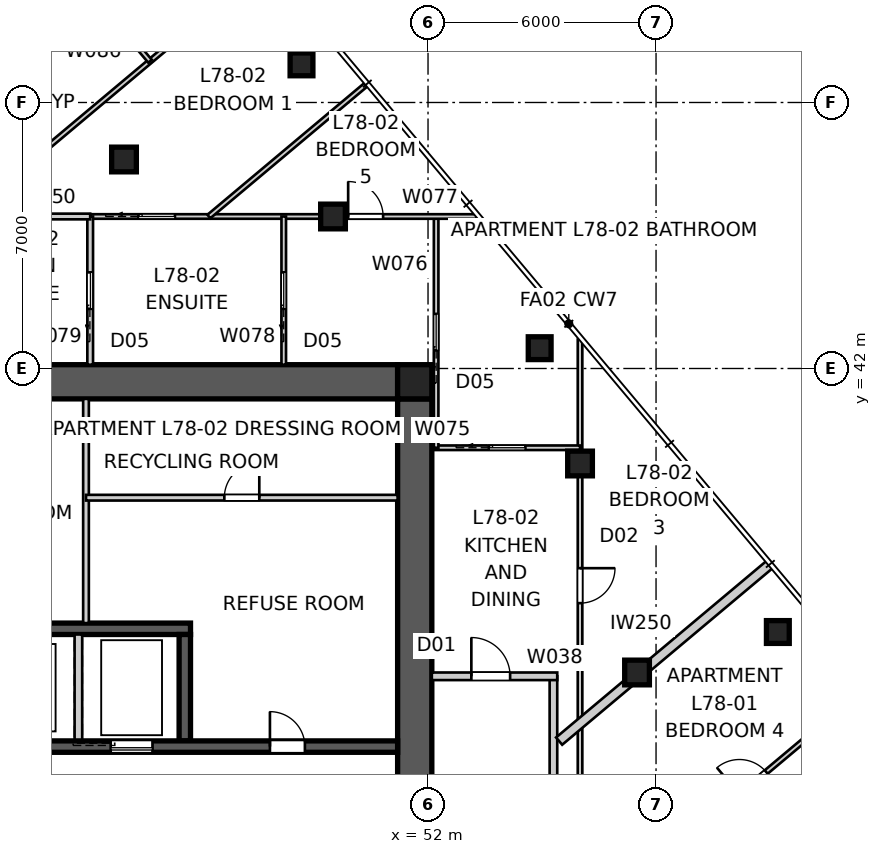
"""IFC4 building model, lengths in metres.
Left out: names, types, materials, properties, quantities, classifications, styles, units other than length and angle.
Written with IfcOpenShell. Run it as: python <this file> out.ifc"""

import sys

from ifc_helpers import new_model, si_unit, direction, frame, frame_2d, origin, origin_2d, place, context, subcontext, project, spatial, polyline, rectangle, outline, extrude, element, fill, save


model = new_model("IFC4")
c1 = context("Model", 3, precision=1e-05, world=origin(), true_north=direction((0.0, 1.0)))
c2 = subcontext(c1, "Body", "Model", "MODEL_VIEW")
j1 = project(units=[si_unit("LENGTHUNIT", "METRE"), si_unit("PLANEANGLEUNIT", "RADIAN")], contexts=[c1])
p1 = place(None, origin())
s1 = spatial("IfcSite", under=j1, at=p1, CompositionType="ELEMENT")
p2 = place(p1, origin())
s2 = spatial("IfcBuilding", under=s1, at=p2, CompositionType="ELEMENT")
p3 = place(p2, frame((0.0, 0.0, 282.8)))
s3 = spatial("IfcBuildingStorey", under=s2, at=p3, CompositionType="ELEMENT", Elevation=282.8)
p4 = place(p3, frame((28.8, 41.65, 0.0), z_axis=(0.0, 0.0, 1.0), x_axis=(1.0, 0.0, 0.0)))
e1 = element("IfcWall", 1, at=p4, inside=s3, PredefinedType="SHEAR", context=c2, shape_type="SweptSolid", body=[
    extrude(outline(polyline([(0.0, -0.45), (22.4, -0.45), (22.4, -0.025), (22.85, -0.025), (22.85, 0.025), (22.4, 0.025), (22.4, 0.45), (0.0, 0.45), (0.0, 0.025), (-0.45, 0.025), (-0.45, -0.025), (0.0, -0.025), (0.0, -0.45)])), origin(), (0.0, 0.0, 1.0), 3.4),
])
p5 = place(p3, frame((51.65, 18.8, 0.0), z_axis=(0.0, 0.0, 1.0), x_axis=(0.0, 1.0, 0.0)))
e2 = element("IfcWall", 2, at=p5, inside=s3, PredefinedType="SHEAR", context=c2, shape_type="SweptSolid", body=[
    extrude(outline(polyline([(0.0, -0.45), (22.4, -0.45), (22.4, -0.025), (22.85, -0.025), (22.85, 0.025), (22.4, 0.025), (22.4, 0.45), (0.0, 0.45), (0.0, 0.025), (-0.45, 0.025), (-0.45, -0.025), (0.0, -0.025), (0.0, -0.45)])), origin(), (0.0, 0.0, 1.0), 3.4),
])
p6 = place(p5, frame((11.14, 0.0, 0.0)))
e3 = element("IfcOpeningElement", 3, at=p6, cuts=e2, PredefinedType="OPENING", context=c2, shape_type="SweptSolid", body=[
    extrude(rectangle(XDim=1.02, YDim=2.4, at=frame_2d((0.51, 1.2))), frame((0.0, 0.46, 0.0), z_axis=(0.0, -1.0, 0.0), x_axis=(1.0, 0.0, 0.0)), (0.0, 0.0, 1.0), 0.92),
])
p7 = place(p3, frame((28.8, 32.05, 0.0), z_axis=(0.0, 0.0, 1.0), x_axis=(1.0, 0.0, 0.0)))
e4 = element("IfcWall", 4, at=p7, inside=s3, PredefinedType="SHEAR", context=c2, shape_type="SweptSolid", body=[
    extrude(rectangle(XDim=22.4, YDim=0.3, at=frame_2d((11.2, 0.0))), origin(), (0.0, 0.0, 1.0), 3.4),
])
p8 = place(p7, frame((19.04, 0.0, 0.0)))
e5 = element("IfcOpeningElement", 5, at=p8, cuts=e4, PredefinedType="OPENING", context=c2, shape_type="SweptSolid", body=[
    extrude(rectangle(XDim=0.92, YDim=2.1, at=frame_2d((0.46, 1.05))), frame((0.0, 0.16, 0.0), z_axis=(0.0, -1.0, 0.0), x_axis=(1.0, 0.0, 0.0)), (0.0, 0.0, 1.0), 0.32),
])
p9 = place(p7, frame((1.265, 0.0, 0.0)))
e6 = element("IfcOpeningElement", 6, at=p9, cuts=e4, PredefinedType="OPENING", context=c2, shape_type="SweptSolid", body=[
    extrude(rectangle(XDim=1.02, YDim=2.1, at=frame_2d((0.51, 1.05))), frame((0.0, 0.16, 0.0), z_axis=(0.0, -1.0, 0.0), x_axis=(1.0, 0.0, 0.0)), (0.0, 0.0, 1.0), 0.32),
])
p10 = place(p7, frame((4.015, 0.0, 0.0)))
e7 = element("IfcOpeningElement", 7, at=p10, cuts=e4, PredefinedType="OPENING", context=c2, shape_type="SweptSolid", body=[
    extrude(rectangle(XDim=0.92, YDim=2.1, at=frame_2d((0.46, 1.05))), frame((0.0, 0.16, 0.0), z_axis=(0.0, -1.0, 0.0), x_axis=(1.0, 0.0, 0.0)), (0.0, 0.0, 1.0), 0.32),
])
p11 = place(p7, frame((6.565, 0.0, 0.0)))
e8 = element("IfcOpeningElement", 8, at=p11, cuts=e4, PredefinedType="OPENING", context=c2, shape_type="SweptSolid", body=[
    extrude(rectangle(XDim=0.92, YDim=2.1, at=frame_2d((0.46, 1.05))), frame((0.0, 0.16, 0.0), z_axis=(0.0, -1.0, 0.0), x_axis=(1.0, 0.0, 0.0)), (0.0, 0.0, 1.0), 0.32),
])
p12 = place(p7, frame((8.89, 0.0, 0.0)))
e9 = element("IfcOpeningElement", 9, at=p12, cuts=e4, PredefinedType="OPENING", context=c2, shape_type="SweptSolid", body=[
    extrude(rectangle(XDim=0.92, YDim=2.1, at=frame_2d((0.46, 1.05))), frame((0.0, 0.16, 0.0), z_axis=(0.0, -1.0, 0.0), x_axis=(1.0, 0.0, 0.0)), (0.0, 0.0, 1.0), 0.32),
])
p13 = place(p7, frame((12.05, 0.0, 0.0)))
e10 = element("IfcOpeningElement", 10, at=p13, cuts=e4, PredefinedType="OPENING", context=c2, shape_type="SweptSolid", body=[
    extrude(rectangle(XDim=1.1, YDim=2.1, at=frame_2d((0.55, 1.05))), frame((0.0, 0.16, 0.0), z_axis=(0.0, -1.0, 0.0), x_axis=(1.0, 0.0, 0.0)), (0.0, 0.0, 1.0), 0.32),
])
p14 = place(p7, frame((14.85, 0.0, 0.0)))
e11 = element("IfcOpeningElement", 11, at=p14, cuts=e4, PredefinedType="OPENING", context=c2, shape_type="SweptSolid", body=[
    extrude(rectangle(XDim=1.1, YDim=2.1, at=frame_2d((0.55, 1.05))), frame((0.0, 0.16, 0.0), z_axis=(0.0, -1.0, 0.0), x_axis=(1.0, 0.0, 0.0)), (0.0, 0.0, 1.0), 0.32),
])
p15 = place(p3, frame((34.25, 35.15, 0.0), z_axis=(0.0, 0.0, 1.0), x_axis=(1.0, 0.0, 0.0)))
e12 = element("IfcWall", 12, at=p15, inside=s3, PredefinedType="SHEAR", context=c2, shape_type="SweptSolid", body=[
    extrude(rectangle(XDim=11.5, YDim=0.3, at=frame_2d((5.75, 0.0))), origin(), (0.0, 0.0, 1.0), 3.4),
])
p16 = place(p3, frame((42.8, 32.2, 0.0), z_axis=(0.0, 0.0, 1.0), x_axis=(0.0, 1.0, 0.0)))
e13 = element("IfcWall", 13, at=p16, inside=s3, PredefinedType="SOLIDWALL", context=c2, shape_type="SweptSolid", body=[
    extrude(rectangle(XDim=2.8, YDim=0.2, at=frame_2d((1.4, 0.0))), origin(), (0.0, 0.0, 1.0), 3.4),
])
p17 = place(p3, frame((45.6, 32.2, 0.0), z_axis=(0.0, 0.0, 1.0), x_axis=(0.0, 1.0, 0.0)))
e14 = element("IfcWall", 14, at=p17, inside=s3, PredefinedType="SHEAR", context=c2, shape_type="SweptSolid", body=[
    extrude(rectangle(XDim=2.8, YDim=0.3, at=frame_2d((1.4, 0.0))), origin(), (0.0, 0.0, 1.0), 3.4),
])
p18 = place(p3, frame((51.65, 41.65, 0.0), z_axis=(0.0, 0.0, 1.0), x_axis=(1.0, 0.0, 0.0)))
e15 = element("IfcColumn", 15, at=p18, inside=s3, PredefinedType="COLUMN", context=c2, shape_type="SweptSolid", body=[
    extrude(rectangle(XDim=0.9, YDim=0.9, at=origin_2d()), origin(), (0.0, 0.0, 1.0), 3.4),
])
for number, where, z_axis, x_axis in (
    (16, (61.205, 35.065, 0.0), (0.0, 0.0, 1.0), (1.0, 0.0, 0.0)),
    (17, (54.938, 42.534, 0.0), (0.0, 0.0, 1.0), (1.0, 0.0, 0.0)),
    (18, (48.671, 50.003, 0.0), (0.0, 0.0, 1.0), (1.0, 0.0, 0.0)),
):
    element("IfcColumn", number, at=place(p3, frame(where, z_axis=z_axis, x_axis=x_axis)), inside=s3, PredefinedType="COLUMN", context=c2, shape_type="SweptSolid", body=[
        extrude(rectangle(XDim=0.6, YDim=0.6, at=origin_2d()), origin(), (0.0, 0.0, 1.0), 3.4),
    ])
for number, where, z_axis, x_axis in (
    (19, (57.5, 34.0, 0.0), (0.0, 0.0, 1.0), (1.0, 0.0, 0.0)),
    (20, (56.0, 39.5, 0.0), (0.0, 0.0, 1.0), (1.0, 0.0, 0.0)),
    (21, (49.5, 46.0, 0.0), (0.0, 0.0, 1.0), (1.0, 0.0, 0.0)),
    (22, (44.0, 47.5, 0.0), (0.0, 0.0, 1.0), (1.0, 0.0, 0.0)),
):
    element("IfcColumn", number, at=place(p3, frame(where, z_axis=z_axis, x_axis=x_axis)), inside=s3, PredefinedType="COLUMN", context=c2, shape_type="SweptSolid", body=[
        extrude(rectangle(XDim=0.65, YDim=0.65, at=origin_2d()), origin(), (0.0, 0.0, 1.0), 3.4),
    ])
p19 = place(p3, frame((55.3, 26.1, 0.0), z_axis=(0.0, 0.0, 1.0), x_axis=(0.0, 1.0, 0.0)))
e23 = element("IfcWall", 23, at=p19, inside=s3, PredefinedType="PARTITIONING", context=c2, shape_type="SweptSolid", body=[
    extrude(rectangle(XDim=7.8, YDim=0.2, at=frame_2d((3.9, 0.0))), origin(), (0.0, 0.0, 1.0), 3.25),
])
p20 = place(p3, frame((52.1, 33.9, 0.0), z_axis=(0.0, 0.0, 1.0), x_axis=(1.0, 0.0, 0.0)))
e24 = element("IfcWall", 24, at=p20, inside=s3, PredefinedType="PARTITIONING", context=c2, shape_type="SweptSolid", body=[
    extrude(rectangle(XDim=3.3, YDim=0.2, at=frame_2d((1.65, 0.0))), origin(), (0.0, 0.0, 1.0), 3.25),
])
p21 = place(p20, frame((1.04, 0.0, 0.0)))
e25 = element("IfcOpeningElement", 25, at=p21, cuts=e24, PredefinedType="OPENING", context=c2, shape_type="SweptSolid", body=[
    extrude(rectangle(XDim=1.02, YDim=2.34, at=frame_2d((0.51, 1.17))), frame((0.0, 0.11, 0.0), z_axis=(0.0, -1.0, 0.0), x_axis=(1.0, 0.0, 0.0)), (0.0, 0.0, 1.0), 0.22),
])
p22 = place(p3, frame((61.007, 36.857, 0.0), z_axis=(0.0, 0.0, 1.0), x_axis=(-0.766054150891, -0.642776040237, 0.0)))
e26 = element("IfcWall", 26, at=p22, inside=s3, PredefinedType="PARTITIONING", context=c2, shape_type="SweptSolid", body=[
    extrude(rectangle(XDim=7.254, YDim=0.25, at=frame_2d((3.627, 0.0))), origin(), (0.0, 0.0, 1.0), 3.25),
])
p23 = place(p3, frame((43.0, 41.2, 0.0), z_axis=(0.0, 0.0, 1.0), x_axis=(0.0, -1.0, 0.0)))
e27 = element("IfcWall", 27, at=p23, inside=s3, PredefinedType="SOLIDWALL", context=c2, shape_type="SweptSolid", body=[
    extrude(rectangle(XDim=5.9, YDim=0.15, at=frame_2d((2.95, 0.0))), origin(), (0.0, 0.0, 1.0), 3.25),
])
p24 = place(p3, frame((43.0, 38.6, 0.0), z_axis=(0.0, 0.0, 1.0), x_axis=(1.0, 0.0, 0.0)))
e28 = element("IfcWall", 28, at=p24, inside=s3, PredefinedType="SOLIDWALL", context=c2, shape_type="SweptSolid", body=[
    extrude(rectangle(XDim=8.2, YDim=0.15, at=frame_2d((4.1, 0.0))), origin(), (0.0, 0.0, 1.0), 3.25),
])
p25 = place(p24, frame((3.64, 0.0, 0.0)))
e29 = element("IfcOpeningElement", 29, at=p25, cuts=e28, PredefinedType="OPENING", context=c2, shape_type="SweptSolid", body=[
    extrude(rectangle(XDim=0.92, YDim=2.1, at=frame_2d((0.46, 1.05))), frame((0.0, 0.085, 0.0), z_axis=(0.0, -1.0, 0.0), x_axis=(1.0, 0.0, 0.0)), (0.0, 0.0, 1.0), 0.17),
])
p26 = place(p3, frame((56.0, 42.762, 0.0), z_axis=(0.0, 0.0, 1.0), x_axis=(0.0, -1.0, 0.0)))
e30 = element("IfcWall", 30, at=p26, inside=s3, PredefinedType="PARTITIONING", context=c2, shape_type="SweptSolid", body=[
    extrude(rectangle(XDim=18.995, YDim=0.12, at=frame_2d((9.498, 0.0))), origin(), (0.0, 0.0, 1.0), 2.549),
])
p27 = place(p26, frame((17.238, 0.0, 0.0)))
e31 = element("IfcOpeningElement", 31, at=p27, cuts=e30, PredefinedType="OPENING", context=c2, shape_type="SweptSolid", body=[
    extrude(rectangle(XDim=0.92, YDim=2.34, at=frame_2d((0.46, 1.17))), frame((0.0, 0.07, 0.0), z_axis=(0.0, -1.0, 0.0), x_axis=(1.0, 0.0, 0.0)), (0.0, 0.0, 1.0), 0.14),
])
p28 = place(p26, frame((6.017, 0.0, 0.0)))
e32 = element("IfcOpeningElement", 32, at=p28, cuts=e30, PredefinedType="OPENING", context=c2, shape_type="SweptSolid", body=[
    extrude(rectangle(XDim=0.92, YDim=2.34, at=frame_2d((0.46, 1.17))), frame((0.0, 0.07, 0.0), z_axis=(0.0, -1.0, 0.0), x_axis=(1.0, 0.0, 0.0)), (0.0, 0.0, 1.0), 0.14),
])
p29 = place(p3, frame((57.434, 28.475, 0.0), z_axis=(0.0, 0.0, 1.0), x_axis=(0.766033729027, 0.642800378028, 0.0)))
e33 = element("IfcWall", 33, at=p29, inside=s3, PredefinedType="PARTITIONING", context=c2, shape_type="SweptSolid", body=[
    extrude(rectangle(XDim=8.085, YDim=0.12, at=frame_2d((4.042, 0.0))), origin(), (0.0, 0.0, 1.0), 3.25),
])
p30 = place(p29, frame((3.603, 0.0, 0.0)))
e34 = element("IfcOpeningElement", 34, at=p30, cuts=e33, PredefinedType="OPENING", context=c2, shape_type="SweptSolid", body=[
    extrude(rectangle(XDim=0.92, YDim=2.34, at=frame_2d((0.46, 1.17))), frame((0.0, 0.07, 0.0), z_axis=(0.0, -1.0, 0.0), x_axis=(1.0, 0.0, 0.0)), (0.0, 0.0, 1.0), 0.14),
])
p31 = place(p3, frame((52.163, 39.914, 0.0), z_axis=(0.0, 0.0, 1.0), x_axis=(1.0, 0.0, 0.0)))
e35 = element("IfcWall", 35, at=p31, inside=s3, PredefinedType="PARTITIONING", context=c2, shape_type="SweptSolid", body=[
    extrude(rectangle(XDim=3.837, YDim=0.12, at=frame_2d((1.918, 0.0))), origin(), (0.0, 0.0, 1.0), 3.25),
])
p32 = place(p31, frame((1.438, 0.0, 0.0)))
e36 = element("IfcOpeningElement", 36, at=p32, cuts=e35, PredefinedType="OPENING", context=c2, shape_type="SweptSolid", body=[
    extrude(rectangle(XDim=0.96, YDim=2.1, at=frame_2d((0.48, 1.05))), frame((0.0, 0.07, 0.0), z_axis=(0.0, -1.0, 0.0), x_axis=(1.0, 0.0, 0.0)), (0.0, 0.0, 1.0), 0.14),
])
p33 = place(p3, frame((52.213, 39.914, 0.0), z_axis=(0.0, 0.0, 1.0), x_axis=(0.0, 1.0, 0.0)))
e37 = element("IfcWall", 37, at=p33, inside=s3, PredefinedType="PARTITIONING", context=c2, shape_type="SweptSolid", body=[
    extrude(rectangle(XDim=6.086, YDim=0.12, at=frame_2d((3.043, 0.0))), origin(), (0.0, 0.0, 1.0), 3.25),
])
p34 = place(p33, frame((2.563, 0.0, 0.0)))
e38 = element("IfcOpeningElement", 38, at=p34, cuts=e37, PredefinedType="OPENING", context=c2, shape_type="SweptSolid", body=[
    extrude(rectangle(XDim=0.96, YDim=2.1, at=frame_2d((0.48, 1.05))), frame((0.0, 0.07, 0.0), z_axis=(0.0, -1.0, 0.0), x_axis=(1.0, 0.0, 0.0)), (0.0, 0.0, 1.0), 0.14),
])
p35 = place(p3, frame((43.11, 46.0, 0.0), z_axis=(0.0, 0.0, 1.0), x_axis=(1.0, 0.0, 0.0)))
e39 = element("IfcWall", 39, at=p35, inside=s3, PredefinedType="PARTITIONING", context=c2, shape_type="SweptSolid", body=[
    extrude(rectangle(XDim=10.173, YDim=0.12, at=frame_2d((5.086, 0.0))), origin(), (0.0, 0.0, 1.0), 2.549),
])
p36 = place(p35, frame((6.788, 0.0, 0.0)))
e40 = element("IfcOpeningElement", 40, at=p36, cuts=e39, PredefinedType="OPENING", context=c2, shape_type="SweptSolid", body=[
    extrude(rectangle(XDim=0.92, YDim=2.34, at=frame_2d((0.46, 1.17))), frame((0.0, 0.07, 0.0), z_axis=(0.0, -1.0, 0.0), x_axis=(1.0, 0.0, 0.0)), (0.0, 0.0, 1.0), 0.14),
])
p37 = place(p35, frame((1.271, 0.0, 0.0)))
e41 = element("IfcOpeningElement", 41, at=p37, cuts=e39, PredefinedType="OPENING", context=c2, shape_type="SweptSolid", body=[
    extrude(rectangle(XDim=0.96, YDim=2.1, at=frame_2d((0.48, 1.05))), frame((0.0, 0.07, 0.0), z_axis=(0.0, -1.0, 0.0), x_axis=(1.0, 0.0, 0.0)), (0.0, 0.0, 1.0), 0.14),
])
p38 = place(p3, frame((48.203, 42.1, 0.0), z_axis=(0.0, 0.0, 1.0), x_axis=(0.0, 1.0, 0.0)))
e42 = element("IfcWall", 42, at=p38, inside=s3, PredefinedType="PARTITIONING", context=c2, shape_type="SweptSolid", body=[
    extrude(rectangle(XDim=3.9, YDim=0.12, at=frame_2d((1.95, 0.0))), origin(), (0.0, 0.0, 1.0), 3.25),
])
p39 = place(p38, frame((1.47, 0.0, 0.0)))
e43 = element("IfcOpeningElement", 43, at=p39, cuts=e42, PredefinedType="OPENING", context=c2, shape_type="SweptSolid", body=[
    extrude(rectangle(XDim=0.96, YDim=2.1, at=frame_2d((0.48, 1.05))), frame((0.0, 0.07, 0.0), z_axis=(0.0, -1.0, 0.0), x_axis=(1.0, 0.0, 0.0)), (0.0, 0.0, 1.0), 0.14),
])
p40 = place(p3, frame((43.11, 42.1, 0.0), z_axis=(0.0, 0.0, 1.0), x_axis=(0.0, 1.0, 0.0)))
e44 = element("IfcWall", 44, at=p40, inside=s3, PredefinedType="SOLIDWALL", context=c2, shape_type="SweptSolid", body=[
    extrude(rectangle(XDim=3.9, YDim=0.15, at=frame_2d((1.95, 0.0))), origin(), (0.0, 0.0, 1.0), 3.25),
])
p41 = place(p40, frame((1.47, 0.0, 0.0)))
e45 = element("IfcOpeningElement", 45, at=p41, cuts=e44, PredefinedType="OPENING", context=c2, shape_type="SweptSolid", body=[
    extrude(rectangle(XDim=0.96, YDim=2.1, at=frame_2d((0.48, 1.05))), frame((0.0, 0.085, 0.0), z_axis=(0.0, -1.0, 0.0), x_axis=(1.0, 0.0, 0.0)), (0.0, 0.0, 1.0), 0.17),
])
p42 = place(p3, frame((39.153, 46.0, 0.0), z_axis=(0.0, 0.0, 1.0), x_axis=(1.0, 0.0, 0.0)))
e46 = element("IfcWall", 46, at=p42, inside=s3, PredefinedType="SOLIDWALL", context=c2, shape_type="SweptSolid", body=[
    extrude(rectangle(XDim=3.958, YDim=0.15, at=frame_2d((1.979, 0.0))), origin(), (0.0, 0.0, 1.0), 3.25),
])
p43 = place(p3, frame((47.719, 52.631, 0.0), z_axis=(0.0, 0.0, 1.0), x_axis=(-0.766052076481, -0.64277851249, 0.0)))
e47 = element("IfcWall", 47, at=p43, inside=s3, PredefinedType="PARTITIONING", context=c2, shape_type="SweptSolid", body=[
    extrude(rectangle(XDim=10.316, YDim=0.12, at=frame_2d((5.158, 0.0))), origin(), (0.0, 0.0, 1.0), 3.25),
])
p44 = place(p3, frame((42.06, 53.215, 0.0), z_axis=(0.0, 0.0, 1.0), x_axis=(0.642796729538, -0.766036790562, 0.0)))
e48 = element("IfcWall", 48, at=p44, inside=s3, PredefinedType="PARTITIONING", context=c2, shape_type="SweptSolid", body=[
    extrude(rectangle(XDim=4.085, YDim=0.12, at=frame_2d((2.042, 0.0))), origin(), (0.0, 0.0, 1.0), 3.25),
])
p45 = place(p44, frame((1.538, 0.0, 0.0)))
e49 = element("IfcOpeningElement", 49, at=p45, cuts=e48, PredefinedType="OPENING", context=c2, shape_type="SweptSolid", body=[
    extrude(rectangle(XDim=0.92, YDim=2.34, at=frame_2d((0.46, 1.17))), frame((0.0, 0.07, 0.0), z_axis=(0.0, -1.0, 0.0), x_axis=(1.0, 0.0, 0.0)), (0.0, 0.0, 1.0), 0.14),
])
p46 = place(p3, frame((50.37, 49.471, 0.0), z_axis=(0.0, 0.0, 1.0), x_axis=(-0.766056536168, -0.642773197476, 0.0)))
e50 = element("IfcWall", 50, at=p46, inside=s3, PredefinedType="PARTITIONING", context=c2, shape_type="SweptSolid", body=[
    extrude(rectangle(XDim=5.4, YDim=0.12, at=frame_2d((2.7, 0.0))), origin(), (0.0, 0.0, 1.0), 3.25),
])
p47 = place(p8, origin())
e51 = element("IfcDoor", 51, at=p47, inside=s3, OperationType="SINGLE_SWING_LEFT", PredefinedType="DOOR", context=c2, shape_type="SweptSolid", body=[
    extrude(rectangle(XDim=0.92, YDim=2.1, at=frame_2d((0.46, 1.05))), frame((0.0, 0.025, 0.0), z_axis=(0.0, -1.0, 0.0), x_axis=(1.0, 0.0, 0.0)), (0.0, 0.0, 1.0), 0.05),
])
fill(e5, e51)
p48 = place(p21, origin())
e52 = element("IfcDoor", 52, at=p48, inside=s3, OperationType="SINGLE_SWING_LEFT", PredefinedType="DOOR", context=c2, shape_type="SweptSolid", body=[
    extrude(rectangle(XDim=1.02, YDim=2.34, at=frame_2d((0.51, 1.17))), frame((0.0, 0.025, 0.0), z_axis=(0.0, -1.0, 0.0), x_axis=(1.0, 0.0, 0.0)), (0.0, 0.0, 1.0), 0.05),
])
fill(e25, e52)
p49 = place(p25, origin())
e53 = element("IfcDoor", 53, at=p49, inside=s3, OperationType="SINGLE_SWING_RIGHT", PredefinedType="DOOR", context=c2, shape_type="SweptSolid", body=[
    extrude(rectangle(XDim=0.92, YDim=2.1, at=frame_2d((0.46, 1.05))), frame((0.0, 0.025, 0.0), z_axis=(0.0, -1.0, 0.0), x_axis=(1.0, 0.0, 0.0)), (0.0, 0.0, 1.0), 0.05),
])
fill(e29, e53)
p50 = place(p28, origin())
e54 = element("IfcDoor", 54, at=p50, inside=s3, OperationType="SINGLE_SWING_LEFT", PredefinedType="DOOR", context=c2, shape_type="SweptSolid", body=[
    extrude(rectangle(XDim=0.92, YDim=2.34, at=frame_2d((0.46, 1.17))), frame((0.0, 0.025, 0.0), z_axis=(0.0, -1.0, 0.0), x_axis=(1.0, 0.0, 0.0)), (0.0, 0.0, 1.0), 0.05),
])
fill(e32, e54)
p51 = place(p32, origin())
e55 = element("IfcDoor", 55, at=p51, inside=s3, OperationType="SLIDING_TO_LEFT", PredefinedType="DOOR", context=c2, shape_type="SweptSolid", body=[
    extrude(rectangle(XDim=0.96, YDim=2.1, at=frame_2d((0.48, 1.05))), frame((0.0, 0.025, 0.0), z_axis=(0.0, -1.0, 0.0), x_axis=(1.0, 0.0, 0.0)), (0.0, 0.0, 1.0), 0.05),
])
fill(e36, e55)
p52 = place(p34, origin())
e56 = element("IfcDoor", 56, at=p52, inside=s3, OperationType="SLIDING_TO_LEFT", PredefinedType="DOOR", context=c2, shape_type="SweptSolid", body=[
    extrude(rectangle(XDim=0.96, YDim=2.1, at=frame_2d((0.48, 1.05))), frame((0.0, 0.025, 0.0), z_axis=(0.0, -1.0, 0.0), x_axis=(1.0, 0.0, 0.0)), (0.0, 0.0, 1.0), 0.05),
])
fill(e38, e56)
p53 = place(p36, origin())
e57 = element("IfcDoor", 57, at=p53, inside=s3, OperationType="SINGLE_SWING_LEFT", PredefinedType="DOOR", context=c2, shape_type="SweptSolid", body=[
    extrude(rectangle(XDim=0.92, YDim=2.34, at=frame_2d((0.46, 1.17))), frame((0.0, 0.025, 0.0), z_axis=(0.0, -1.0, 0.0), x_axis=(1.0, 0.0, 0.0)), (0.0, 0.0, 1.0), 0.05),
])
fill(e40, e57)
p54 = place(p39, origin())
e58 = element("IfcDoor", 58, at=p54, inside=s3, OperationType="SLIDING_TO_LEFT", PredefinedType="DOOR", context=c2, shape_type="SweptSolid", body=[
    extrude(rectangle(XDim=0.96, YDim=2.1, at=frame_2d((0.48, 1.05))), frame((0.0, 0.025, 0.0), z_axis=(0.0, -1.0, 0.0), x_axis=(1.0, 0.0, 0.0)), (0.0, 0.0, 1.0), 0.05),
])
fill(e43, e58)
p55 = place(p41, origin())
e59 = element("IfcDoor", 59, at=p55, inside=s3, OperationType="SLIDING_TO_LEFT", PredefinedType="DOOR", context=c2, shape_type="SweptSolid", body=[
    extrude(rectangle(XDim=0.96, YDim=2.1, at=frame_2d((0.48, 1.05))), frame((0.0, 0.025, 0.0), z_axis=(0.0, -1.0, 0.0), x_axis=(1.0, 0.0, 0.0)), (0.0, 0.0, 1.0), 0.05),
])
fill(e45, e59)
p56 = place(p37, origin())
e60 = element("IfcDoor", 60, at=p56, inside=s3, OperationType="SLIDING_TO_LEFT", PredefinedType="DOOR", context=c2, shape_type="SweptSolid", body=[
    extrude(rectangle(XDim=0.96, YDim=2.1, at=frame_2d((0.48, 1.05))), frame((0.0, 0.025, 0.0), z_axis=(0.0, -1.0, 0.0), x_axis=(1.0, 0.0, 0.0)), (0.0, 0.0, 1.0), 0.05),
])
fill(e41, e60)
p57 = place(p30, origin())
e61 = element("IfcDoor", 61, at=p57, inside=s3, OperationType="SINGLE_SWING_LEFT", PredefinedType="DOOR", context=c2, shape_type="SweptSolid", body=[
    extrude(rectangle(XDim=0.92, YDim=2.34, at=frame_2d((0.46, 1.17))), frame((0.0, 0.025, 0.0), z_axis=(0.0, -1.0, 0.0), x_axis=(1.0, 0.0, 0.0)), (0.0, 0.0, 1.0), 0.05),
])
fill(e34, e61)
p58 = place(p14, origin())
e62 = element("IfcDoor", 62, at=p58, inside=s3, OperationType="SLIDING_TO_LEFT", PredefinedType="DOOR", context=c2, shape_type="SweptSolid", body=[
    extrude(rectangle(XDim=1.1, YDim=2.1, at=frame_2d((0.55, 1.05))), frame((0.0, 0.025, 0.0), z_axis=(0.0, -1.0, 0.0), x_axis=(1.0, 0.0, 0.0)), (0.0, 0.0, 1.0), 0.05),
])
fill(e11, e62)
save(model, sys.argv[1])
